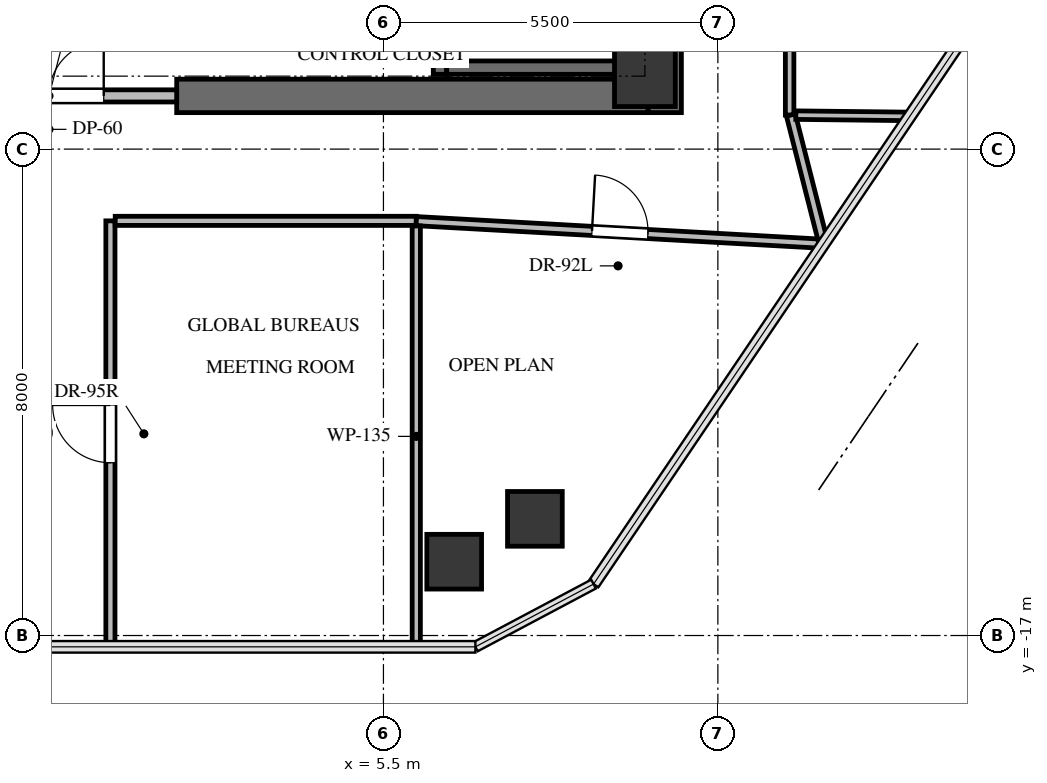
"""IFC4 building model, lengths in metres.
Left out: names, types, materials, properties, quantities, classifications, styles, units other than length and angle.
Written with IfcOpenShell. Run it as: python <this file> out.ifc"""

import sys

from ifc_helpers import new_model, si_unit, direction, frame, frame_2d, origin, origin_2d, place, context, subcontext, project, spatial, rectangle, extrude, source, transform, mapped, element, fill, save


model = new_model("IFC4")
c1 = context("Model", 3, precision=1e-05, world=origin(), true_north=direction((0.0, 1.0)))
c2 = subcontext(c1, "Body", "Model", "MODEL_VIEW")
j1 = project(units=[si_unit("LENGTHUNIT", "METRE"), si_unit("PLANEANGLEUNIT", "RADIAN")], contexts=[c1])
p1 = place(None, origin())
s1 = spatial("IfcSite", under=j1, at=p1, CompositionType="ELEMENT")
p2 = place(p1, origin())
s2 = spatial("IfcBuilding", under=s1, at=p2, CompositionType="ELEMENT")
p3 = place(p2, frame((0.0, 0.0, 234.8)))
s3 = spatial("IfcBuildingStorey", under=s2, at=p3, CompositionType="ELEMENT", Elevation=234.8)
p4 = place(p3, frame((10.125, -8.4, 0.0), z_axis=(0.0, 0.0, 1.0), x_axis=(0.0, 1.0, 0.0)))
e1 = element("IfcWall", 1, at=p4, inside=s3, PredefinedType="SHEAR", context=c2, shape_type="SweptSolid", body=[
    extrude(rectangle(XDim=16.8, YDim=0.55, at=frame_2d((8.4, 0.0))), origin(), (0.0, 0.0, 1.0), 3.3),
])
p5 = place(p3, frame((2.1, -8.125, 0.0), z_axis=(0.0, 0.0, 1.0), x_axis=(1.0, 0.0, 0.0)))
e2 = element("IfcWall", 2, at=p5, inside=s3, PredefinedType="SHEAR", context=c2, shape_type="SweptSolid", body=[
    extrude(rectangle(XDim=7.75, YDim=0.55, at=frame_2d((3.875, 0.0))), origin(), (0.0, 0.0, 1.0), 3.3),
])
p6 = place(p3, frame((9.61, -7.77, -0.24), z_axis=(0.0, 0.0, 1.0), x_axis=(0.0, 1.0, 0.0)))
e3 = element("IfcWall", 3, at=p6, inside=s3, PredefinedType="SHEAR", context=c2, shape_type="SweptSolid", body=[
    extrude(rectangle(XDim=7.89, YDim=0.22, at=frame_2d((3.945, 0.0))), origin(), (0.0, 0.0, 1.0), 3.3),
])
p7 = place(p3, frame((6.43, 0.12, -0.24), z_axis=(0.0, 0.0, 1.0), x_axis=(0.0, -1.0, 0.0)))
e4 = element("IfcWall", 4, at=p7, inside=s3, PredefinedType="SHEAR", context=c2, shape_type="SweptSolid", body=[
    extrude(rectangle(XDim=7.89, YDim=0.22, at=frame_2d((3.945, 0.0))), origin(), (0.0, 0.0, 1.0), 3.3),
])
p8 = place(p7, frame((0.52, 0.0, 0.0)))
e5 = element("IfcOpeningElement", 5, at=p8, cuts=e4, PredefinedType="OPENING", context=c2, shape_type="SweptSolid", body=[
    extrude(rectangle(XDim=1.05, YDim=2.15, at=frame_2d((0.525, 1.075))), frame((0.0, 0.12, 0.0), z_axis=(0.0, -1.0, 0.0), x_axis=(1.0, 0.0, 0.0)), (0.0, 0.0, 1.0), 0.24),
])
p9 = place(p3, frame((6.54, -7.66, -0.24), z_axis=(0.0, 0.0, 1.0), x_axis=(1.0, 0.0, 0.0)))
e6 = element("IfcWall", 6, at=p9, inside=s3, PredefinedType="SHEAR", context=c2, shape_type="SweptSolid", body=[
    extrude(rectangle(XDim=2.96, YDim=0.22, at=frame_2d((1.48, 0.0))), origin(), (0.0, 0.0, 1.0), 3.3),
])
m1 = source(origin(), c2, "Body", "SweptSolid", [
    extrude(rectangle(XDim=1.0, YDim=1.0, at=origin_2d()), origin(), (0.0, 0.0, 1.0), 3.3),
])
p10 = place(p3, frame((9.8, -7.8, -0.24), z_axis=(0.0, 0.0, 1.0), x_axis=(1.0, 0.0, 0.0)))
e7 = element("IfcColumn", 7, at=p10, inside=s3, PredefinedType="COLUMN", context=c2, shape_type="MappedRepresentation", body=[
    mapped(m1, transform((0.0, 0.0, 0.0), x_axis=(1.0, 0.0, 0.0), y_axis=(0.0, 1.0, 0.0), z_axis=(0.0, 0.0, 1.0), scale=1.0)),
])
m2 = source(origin(), c2, "Body", "SweptSolid", [
    extrude(rectangle(XDim=0.9, YDim=0.9, at=origin_2d()), origin(), (0.0, 0.0, 1.0), 3.3),
])
for number, where, z_axis, x_axis in (
    (8, (7.991, -15.081, -0.24), (0.0, 0.0, 1.0), (1.0, 0.0, 0.0)),
    (9, (6.664, -15.786, -0.24), (0.0, 0.0, 1.0), (1.0, 0.0, 0.0)),
):
    element("IfcColumn", number, at=place(p3, frame(where, z_axis=z_axis, x_axis=x_axis)), inside=s3, PredefinedType="COLUMN", context=c2, shape_type="MappedRepresentation", body=[
        mapped(m2, transform((0.0, 0.0, 0.0), x_axis=(1.0, 0.0, 0.0), y_axis=(0.0, 1.0, 0.0), z_axis=(0.0, 0.0, 1.0), scale=1.0)),
    ])
p11 = place(p3, frame((-2.1, -8.125, 0.0), z_axis=(0.0, 0.0, 1.0), x_axis=(1.0, 0.0, 0.0)))
e10 = element("IfcWall", 10, at=p11, inside=s3, PredefinedType="SOLIDWALL", context=c2, shape_type="SweptSolid", body=[
    extrude(rectangle(XDim=4.2, YDim=0.2, at=frame_2d((2.1, 0.0))), origin(), (0.0, 0.0, 1.0), 3.045),
])
p12 = place(p11, frame((1.2, 0.0, 0.0)))
e11 = element("IfcOpeningElement", 11, at=p12, cuts=e10, PredefinedType="OPENING", context=c2, shape_type="SweptSolid", body=[
    extrude(rectangle(XDim=1.8, YDim=2.15, at=frame_2d((0.9, 1.075))), frame((0.0, 0.11, 0.0), z_axis=(0.0, -1.0, 0.0), x_axis=(1.0, 0.0, 0.0)), (0.0, 0.0, 1.0), 0.22),
])
p13 = place(p3, frame((12.18, -8.44, 0.0), z_axis=(0.0, 0.0, 1.0), x_axis=(0.0, 1.0, 0.0)))
e12 = element("IfcWall", 12, at=p13, inside=s3, PredefinedType="PARTITIONING", context=c2, shape_type="SweptSolid", body=[
    extrude(rectangle(XDim=3.48, YDim=0.14, at=frame_2d((1.74, 0.0))), origin(), (0.0, 0.0, 1.0), 2.399),
])
p14 = place(p13, frame((1.29, 0.0, 0.0)))
e13 = element("IfcOpeningElement", 13, at=p14, cuts=e12, PredefinedType="OPENING", context=c2, shape_type="SweptSolid", body=[
    extrude(rectangle(XDim=0.9, YDim=2.05, at=frame_2d((0.45, 1.025))), frame((0.0, 0.08, 0.0), z_axis=(0.0, -1.0, 0.0), x_axis=(1.0, 0.0, 0.0)), (0.0, 0.0, 1.0), 0.16),
])
p15 = place(p3, frame((1.01, -17.186, 0.0), z_axis=(0.0, 0.0, 1.0), x_axis=(0.0, 1.0, 0.0)))
e14 = element("IfcWall", 14, at=p15, inside=s3, PredefinedType="PARTITIONING", context=c2, shape_type="SweptSolid", body=[
    extrude(rectangle(XDim=7.006, YDim=0.15, at=frame_2d((3.503, 0.0))), origin(), (0.0, 0.0, 1.0), 2.399),
])
p16 = place(p15, frame((3.028, 0.0, 0.0)))
e15 = element("IfcOpeningElement", 15, at=p16, cuts=e14, PredefinedType="OPENING", context=c2, shape_type="SweptSolid", body=[
    extrude(rectangle(XDim=0.95, YDim=2.1, at=frame_2d((0.475, 1.05))), frame((0.0, 0.085, 0.0), z_axis=(0.0, -1.0, 0.0), x_axis=(1.0, 0.0, 0.0)), (0.0, 0.0, 1.0), 0.17),
])
p17 = place(p3, frame((1.089, -10.18, 0.0), z_axis=(0.0, 0.0, 1.0), x_axis=(1.0, 0.0, 0.0)))
e16 = element("IfcWall", 16, at=p17, inside=s3, PredefinedType="PARTITIONING", context=c2, shape_type="SweptSolid", body=[
    extrude(rectangle(XDim=4.951, YDim=0.15, at=frame_2d((2.476, 0.0))), origin(), (0.0, 0.0, 1.0), 2.301),
])
p18 = place(p3, frame((6.04, -10.185, 0.0), z_axis=(0.0, 0.0, 1.0), x_axis=(0.998451046252, -0.055637291801, 0.0)))
e17 = element("IfcWall", 17, at=p18, inside=s3, PredefinedType="PARTITIONING", context=c2, shape_type="SweptSolid", body=[
    extrude(rectangle(XDim=6.709, YDim=0.15, at=frame_2d((3.355, 0.0))), origin(), (0.0, 0.0, 1.0), 2.399),
])
p19 = place(p18, frame((2.895, 0.0, 0.0)))
e18 = element("IfcOpeningElement", 18, at=p19, cuts=e17, PredefinedType="OPENING", context=c2, shape_type="SweptSolid", body=[
    extrude(rectangle(XDim=0.92, YDim=2.1, at=frame_2d((0.46, 1.05))), frame((0.0, 0.085, 0.0), z_axis=(0.0, -1.0, 0.0), x_axis=(1.0, 0.0, 0.0)), (0.0, 0.0, 1.0), 0.17),
])
p20 = place(p3, frame((12.719, -10.478, 0.0), z_axis=(0.0, 0.0, 1.0), x_axis=(-0.246522636262, 0.969137033556, 0.0)))
e19 = element("IfcWall", 19, at=p20, inside=s3, PredefinedType="PARTITIONING", context=c2, shape_type="SweptSolid", body=[
    extrude(rectangle(XDim=2.103, YDim=0.15, at=frame_2d((1.051, 0.0))), origin(), (0.0, 0.0, 1.0), 2.399),
])
p21 = place(p3, frame((14.156, -8.462, 0.0), z_axis=(0.0, 0.0, 1.0), x_axis=(-0.999935742613, 0.011336253532, 0.0)))
e20 = element("IfcWall", 20, at=p21, inside=s3, PredefinedType="PARTITIONING", context=c2, shape_type="SweptSolid", body=[
    extrude(rectangle(XDim=1.874, YDim=0.14, at=frame_2d((0.937, 0.0))), origin(), (0.0, 0.0, 1.0), 2.399),
])
p22 = place(p3, frame((6.04, -10.264, 0.0), z_axis=(0.0, 0.0, 1.0), x_axis=(0.0, -1.0, 0.0)))
e21 = element("IfcWall", 21, at=p22, inside=s3, PredefinedType="PARTITIONING", context=c2, shape_type="SweptSolid", body=[
    extrude(rectangle(XDim=6.922, YDim=0.135, at=frame_2d((3.461, 0.0))), origin(), (0.0, 0.0, 1.0), 2.301),
])
m3 = source(origin(), c2, "Body", "SweptSolid", [
    extrude(rectangle(XDim=1.8, YDim=2.15, at=frame_2d((0.9, 1.075))), frame((0.0, 0.025, 0.0), z_axis=(0.0, -1.0, 0.0), x_axis=(1.0, 0.0, 0.0)), (0.0, 0.0, 1.0), 0.05),
])
p23 = place(p12, origin())
e22 = element("IfcDoor", 22, at=p23, inside=s3, OperationType="DOUBLE_DOOR_SINGLE_SWING", PredefinedType="DOOR", context=c2, shape_type="MappedRepresentation", body=[
    mapped(m3, transform((0.0, 0.0, 0.0), x_axis=(1.0, 0.0, 0.0), y_axis=(0.0, 1.0, 0.0), z_axis=(0.0, 0.0, 1.0), scale=1.0)),
])
fill(e11, e22)
m4 = source(origin(), c2, "Body", "SweptSolid", [
    extrude(rectangle(XDim=0.95, YDim=2.1, at=frame_2d((0.475, 1.05))), frame((0.0, 0.025, 0.0), z_axis=(0.0, -1.0, 0.0), x_axis=(1.0, 0.0, 0.0)), (0.0, 0.0, 1.0), 0.05),
])
p24 = place(p16, origin())
e23 = element("IfcDoor", 23, at=p24, inside=s3, OperationType="SINGLE_SWING_RIGHT", PredefinedType="DOOR", context=c2, shape_type="MappedRepresentation", body=[
    mapped(m4, transform((0.0, 0.0, 0.0), x_axis=(1.0, 0.0, 0.0), y_axis=(0.0, 1.0, 0.0), z_axis=(0.0, 0.0, 1.0), scale=1.0)),
])
fill(e15, e23)
m5 = source(origin(), c2, "Body", "SweptSolid", [
    extrude(rectangle(XDim=0.92, YDim=2.1, at=frame_2d((0.46, 1.05))), frame((0.0, 0.025, 0.0), z_axis=(0.0, -1.0, 0.0), x_axis=(1.0, 0.0, 0.0)), (0.0, 0.0, 1.0), 0.05),
])
p25 = place(p19, origin())
e24 = element("IfcDoor", 24, at=p25, inside=s3, OperationType="SINGLE_SWING_LEFT", PredefinedType="DOOR", context=c2, shape_type="MappedRepresentation", body=[
    mapped(m5, transform((0.0, 0.0, 0.0), x_axis=(1.0, 0.0, 0.0), y_axis=(0.0, 1.0, 0.0), z_axis=(0.0, 0.0, 1.0), scale=1.0)),
])
fill(e18, e24)
save(model, sys.argv[1])
